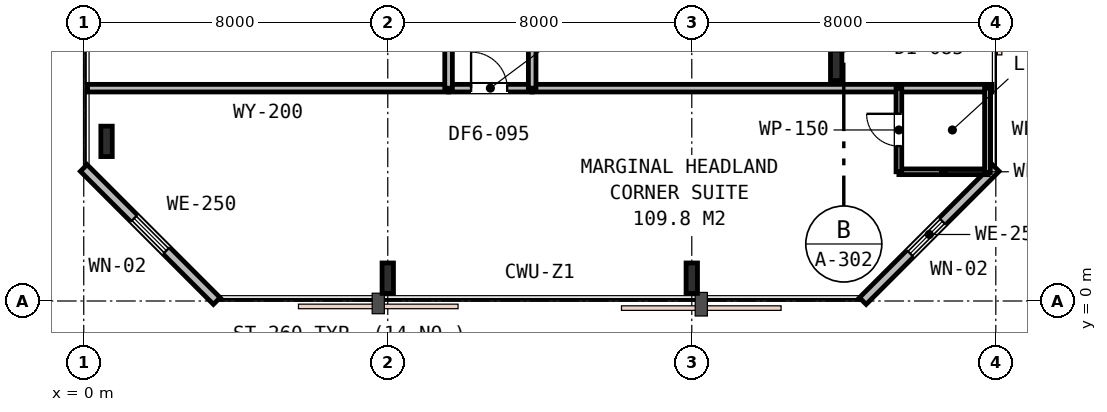
"""IFC4 building model, lengths in metres.
Left out: names, types, materials, properties, quantities, classifications, styles, units other than length and angle.
Written with IfcOpenShell. Run it as: python <this file> out.ifc"""

import sys

from ifc_helpers import new_model, si_unit, direction, frame, frame_2d, origin, origin_2d, place, context, subcontext, project, spatial, rectangle, i_section, extrude, element, fill, save


model = new_model("IFC4")
c1 = context("Model", 3, precision=1e-05, world=origin(), true_north=direction((0.0, 1.0)))
c2 = subcontext(c1, "Body", "Model", "MODEL_VIEW")
j1 = project(units=[si_unit("LENGTHUNIT", "METRE"), si_unit("PLANEANGLEUNIT", "RADIAN")], contexts=[c1])
p1 = place(None, origin())
s1 = spatial("IfcSite", under=j1, at=p1, CompositionType="ELEMENT")
p2 = place(p1, origin())
s2 = spatial("IfcBuilding", under=s1, at=p2, CompositionType="ELEMENT")
p3 = place(p2, frame((0.0, 0.0, 61.8)))
s3 = spatial("IfcBuildingStorey", under=s2, at=p3, CompositionType="ELEMENT", Elevation=61.8)
for number, where, z_axis, x_axis in (
    (1, (0.6, 4.2, 0.0), (0.0, 0.0, 1.0), (1.0, 0.0, 0.0)),
    (2, (8.0, 0.6, 0.0), (0.0, 0.0, 1.0), (1.0, 0.0, 0.0)),
    (3, (16.0, 0.6, 0.0), (0.0, 0.0, 1.0), (1.0, 0.0, 0.0)),
    (4, (19.8, 6.2, 0.0), (0.0, 0.0, 1.0), (1.0, 0.0, 0.0)),
):
    element("IfcColumn", number, at=place(p3, frame(where, z_axis=z_axis, x_axis=x_axis)), inside=s3, PredefinedType="COLUMN", context=c2, shape_type="SweptSolid", body=[
        extrude(i_section(OverallWidth=0.3, OverallDepth=0.8, WebThickness=0.018, FlangeThickness=0.033, FilletRadius=0.03, at=origin_2d()), origin(), (0.0, 0.0, 1.0), 3.6),
    ])
p4 = place(p3, frame((20.5, 0.0, 0.0), z_axis=(0.0, 0.0, 1.0), x_axis=(0.707106781187, 0.707106781187, 0.0)))
e5 = element("IfcWall", 5, at=p4, inside=s3, PredefinedType="STANDARD", context=c2, shape_type="SweptSolid", body=[
    extrude(rectangle(XDim=4.95, YDim=0.25, at=frame_2d((2.475, 0.0))), origin(), (0.0, 0.0, 1.0), 3.33),
])
p5 = place(p4, frame((1.765, 0.0, 0.85)))
e6 = element("IfcOpeningElement", 6, at=p5, cuts=e5, PredefinedType="OPENING", context=c2, shape_type="SweptSolid", body=[
    extrude(rectangle(XDim=1.2, YDim=1.6, at=frame_2d((0.6, 0.8))), frame((0.0, 0.135, 0.0), z_axis=(0.0, -1.0, 0.0), x_axis=(1.0, 0.0, 0.0)), (0.0, 0.0, 1.0), 0.27),
])
p6 = place(p3, frame((0.0, 3.5, 0.0), z_axis=(0.0, 0.0, 1.0), x_axis=(0.707106781187, -0.707106781187, 0.0)))
e7 = element("IfcWall", 7, at=p6, inside=s3, PredefinedType="STANDARD", context=c2, shape_type="SweptSolid", body=[
    extrude(rectangle(XDim=4.95, YDim=0.25, at=frame_2d((2.475, 0.0))), origin(), (0.0, 0.0, 1.0), 3.33),
])
p7 = place(p6, frame((1.875, 0.0, 0.85)))
e8 = element("IfcOpeningElement", 8, at=p7, cuts=e7, PredefinedType="OPENING", context=c2, shape_type="SweptSolid", body=[
    extrude(rectangle(XDim=1.2, YDim=1.6, at=frame_2d((0.6, 0.8))), frame((0.0, 0.135, 0.0), z_axis=(0.0, -1.0, 0.0), x_axis=(1.0, 0.0, 0.0)), (0.0, 0.0, 1.0), 0.27),
])
p8 = place(p3, frame((0.1, 5.6, 0.0), z_axis=(0.0, 0.0, 1.0), x_axis=(1.0, 0.0, 0.0)))
e9 = element("IfcWall", 9, at=p8, inside=s3, PredefinedType="PARTITIONING", context=c2, shape_type="SweptSolid", body=[
    extrude(rectangle(XDim=9.5, YDim=0.2, at=frame_2d((4.75, 0.0))), origin(), (0.0, 0.0, 1.0), 2.93),
])
p9 = place(p3, frame((11.8, 5.6, 0.0), z_axis=(0.0, 0.0, 1.0), x_axis=(1.0, 0.0, 0.0)))
e10 = element("IfcWall", 10, at=p9, inside=s3, PredefinedType="PARTITIONING", context=c2, shape_type="SweptSolid", body=[
    extrude(rectangle(XDim=12.1, YDim=0.2, at=frame_2d((6.05, 0.0))), origin(), (0.0, 0.0, 1.0), 2.82),
])
p10 = place(p3, frame((9.6, 5.6, 0.0), z_axis=(0.0, 0.0, 1.0), x_axis=(1.0, 0.0, 0.0)))
e11 = element("IfcWall", 11, at=p10, inside=s3, PredefinedType="PARTITIONING", context=c2, shape_type="SweptSolid", body=[
    extrude(rectangle(XDim=2.2, YDim=0.2, at=frame_2d((1.1, 0.0))), origin(), (0.0, 0.0, 1.0), 3.33),
])
p11 = place(p10, frame((0.593, 0.0, 0.0)))
e12 = element("IfcOpeningElement", 12, at=p11, cuts=e11, PredefinedType="OPENING", context=c2, shape_type="SweptSolid", body=[
    extrude(rectangle(XDim=0.95, YDim=2.15, at=frame_2d((0.475, 1.075))), frame((0.0, 0.11, 0.0), z_axis=(0.0, -1.0, 0.0), x_axis=(1.0, 0.0, 0.0)), (0.0, 0.0, 1.0), 0.22),
])
p12 = place(p3, frame((21.45, 3.4, 0.0), z_axis=(0.0, 0.0, 1.0), x_axis=(1.0, 0.0, 0.0)))
e13 = element("IfcWall", 13, at=p12, inside=s3, PredefinedType="PARTITIONING", context=c2, shape_type="SweptSolid", body=[
    extrude(rectangle(XDim=2.35, YDim=0.15, at=frame_2d((1.175, 0.0))), origin(), (0.0, 0.0, 1.0), 3.33),
])
p13 = place(p3, frame((21.45, 3.4, 0.0), z_axis=(0.0, 0.0, 1.0), x_axis=(0.0, 1.0, 0.0)))
e14 = element("IfcWall", 14, at=p13, inside=s3, PredefinedType="PARTITIONING", context=c2, shape_type="SweptSolid", body=[
    extrude(rectangle(XDim=2.2, YDim=0.15, at=frame_2d((1.1, 0.0))), origin(), (0.0, 0.0, 1.0), 3.33),
])
p14 = place(p13, frame((0.675, 0.0, 0.0)))
e15 = element("IfcOpeningElement", 15, at=p14, cuts=e14, PredefinedType="OPENING", context=c2, shape_type="SweptSolid", body=[
    extrude(rectangle(XDim=0.85, YDim=2.15, at=frame_2d((0.425, 1.075))), frame((0.0, 0.085, 0.0), z_axis=(0.0, -1.0, 0.0), x_axis=(1.0, 0.0, 0.0)), (0.0, 0.0, 1.0), 0.17),
])
p15 = place(p3, frame((23.78, 5.6, 0.0), z_axis=(0.0, 0.0, 1.0), x_axis=(0.0, -1.0, 0.0)))
e16 = element("IfcWall", 16, at=p15, inside=s3, PredefinedType="PARTITIONING", context=c2, shape_type="SweptSolid", body=[
    extrude(rectangle(XDim=2.22, YDim=0.15, at=frame_2d((1.11, 0.0))), origin(), (0.0, 0.0, 1.0), 3.33),
])
p16 = place(p3, frame((9.6, 5.6, 0.0), z_axis=(0.0, 0.0, 1.0), x_axis=(0.0, 1.0, 0.0)))
e17 = element("IfcWall", 17, at=p16, inside=s3, PredefinedType="PARTITIONING", context=c2, shape_type="SweptSolid", body=[
    extrude(rectangle(XDim=23.0, YDim=0.2, at=frame_2d((11.5, 0.0))), origin(), (0.0, 0.0, 1.0), 2.82),
])
p17 = place(p16, frame((4.27, 0.0, 0.0)))
e18 = element("IfcOpeningElement", 18, at=p17, cuts=e17, PredefinedType="OPENING", context=c2, shape_type="SweptSolid", body=[
    extrude(rectangle(XDim=0.95, YDim=2.15, at=frame_2d((0.475, 1.075))), frame((0.0, 0.11, 0.0), z_axis=(0.0, -1.0, 0.0), x_axis=(1.0, 0.0, 0.0)), (0.0, 0.0, 1.0), 0.22),
])
p18 = place(p16, frame((10.17, 0.0, 0.0)))
e19 = element("IfcOpeningElement", 19, at=p18, cuts=e17, PredefinedType="OPENING", context=c2, shape_type="SweptSolid", body=[
    extrude(rectangle(XDim=0.95, YDim=2.15, at=frame_2d((0.475, 1.075))), frame((0.0, 0.11, 0.0), z_axis=(0.0, -1.0, 0.0), x_axis=(1.0, 0.0, 0.0)), (0.0, 0.0, 1.0), 0.22),
])
p19 = place(p16, frame((19.693, 0.0, 0.0)))
e20 = element("IfcOpeningElement", 20, at=p19, cuts=e17, PredefinedType="OPENING", context=c2, shape_type="SweptSolid", body=[
    extrude(rectangle(XDim=0.95, YDim=2.15, at=frame_2d((0.475, 1.075))), frame((0.0, 0.11, 0.0), z_axis=(0.0, -1.0, 0.0), x_axis=(1.0, 0.0, 0.0)), (0.0, 0.0, 1.0), 0.22),
])
p20 = place(p3, frame((11.8, 5.6, 0.0), z_axis=(0.0, 0.0, 1.0), x_axis=(0.0, 1.0, 0.0)))
e21 = element("IfcWall", 21, at=p20, inside=s3, PredefinedType="PARTITIONING", context=c2, shape_type="SweptSolid", body=[
    extrude(rectangle(XDim=23.0, YDim=0.2, at=frame_2d((11.5, 0.0))), origin(), (0.0, 0.0, 1.0), 2.82),
])
p21 = place(p20, frame((2.19, 0.0, 0.0)))
e22 = element("IfcOpeningElement", 22, at=p21, cuts=e21, PredefinedType="OPENING", context=c2, shape_type="SweptSolid", body=[
    extrude(rectangle(XDim=0.95, YDim=2.15, at=frame_2d((0.475, 1.075))), frame((0.0, 0.11, 0.0), z_axis=(0.0, -1.0, 0.0), x_axis=(1.0, 0.0, 0.0)), (0.0, 0.0, 1.0), 0.22),
])
p22 = place(p20, frame((9.92, 0.0, 0.0)))
e23 = element("IfcOpeningElement", 23, at=p22, cuts=e21, PredefinedType="OPENING", context=c2, shape_type="SweptSolid", body=[
    extrude(rectangle(XDim=0.95, YDim=2.15, at=frame_2d((0.475, 1.075))), frame((0.0, 0.11, 0.0), z_axis=(0.0, -1.0, 0.0), x_axis=(1.0, 0.0, 0.0)), (0.0, 0.0, 1.0), 0.22),
])
p23 = place(p20, frame((17.41, 0.0, 0.0)))
e24 = element("IfcOpeningElement", 24, at=p23, cuts=e21, PredefinedType="OPENING", context=c2, shape_type="SweptSolid", body=[
    extrude(rectangle(XDim=0.95, YDim=2.15, at=frame_2d((0.475, 1.075))), frame((0.0, 0.11, 0.0), z_axis=(0.0, -1.0, 0.0), x_axis=(1.0, 0.0, 0.0)), (0.0, 0.0, 1.0), 0.22),
])
p24 = place(p5, origin())
e25 = element("IfcWindow", 25, at=p24, inside=s3, PartitioningType="SINGLE_PANEL", PredefinedType="WINDOW", context=c2, shape_type="SweptSolid", body=[
    extrude(rectangle(XDim=1.2, YDim=1.6, at=frame_2d((0.6, 0.8))), frame((0.0, 0.03, 0.0), z_axis=(0.0, -1.0, 0.0), x_axis=(1.0, 0.0, 0.0)), (0.0, 0.0, 1.0), 0.06),
])
fill(e6, e25)
p25 = place(p7, origin())
e26 = element("IfcWindow", 26, at=p25, inside=s3, PartitioningType="SINGLE_PANEL", PredefinedType="WINDOW", context=c2, shape_type="SweptSolid", body=[
    extrude(rectangle(XDim=1.2, YDim=1.6, at=frame_2d((0.6, 0.8))), frame((0.0, 0.03, 0.0), z_axis=(0.0, -1.0, 0.0), x_axis=(1.0, 0.0, 0.0)), (0.0, 0.0, 1.0), 0.06),
])
fill(e8, e26)
p26 = place(p11, origin())
e27 = element("IfcDoor", 27, at=p26, inside=s3, OperationType="SINGLE_SWING_LEFT", PredefinedType="DOOR", context=c2, shape_type="SweptSolid", body=[
    extrude(rectangle(XDim=0.95, YDim=2.15, at=frame_2d((0.475, 1.075))), frame((0.0, 0.025, 0.0), z_axis=(0.0, -1.0, 0.0), x_axis=(1.0, 0.0, 0.0)), (0.0, 0.0, 1.0), 0.05),
])
fill(e12, e27)
p27 = place(p14, origin())
e28 = element("IfcDoor", 28, at=p27, inside=s3, OperationType="SINGLE_SWING_RIGHT", PredefinedType="DOOR", context=c2, shape_type="SweptSolid", body=[
    extrude(rectangle(XDim=0.85, YDim=2.15, at=frame_2d((0.425, 1.075))), frame((0.0, 0.025, 0.0), z_axis=(0.0, -1.0, 0.0), x_axis=(1.0, 0.0, 0.0)), (0.0, 0.0, 1.0), 0.05),
])
fill(e15, e28)
save(model, sys.argv[1])
